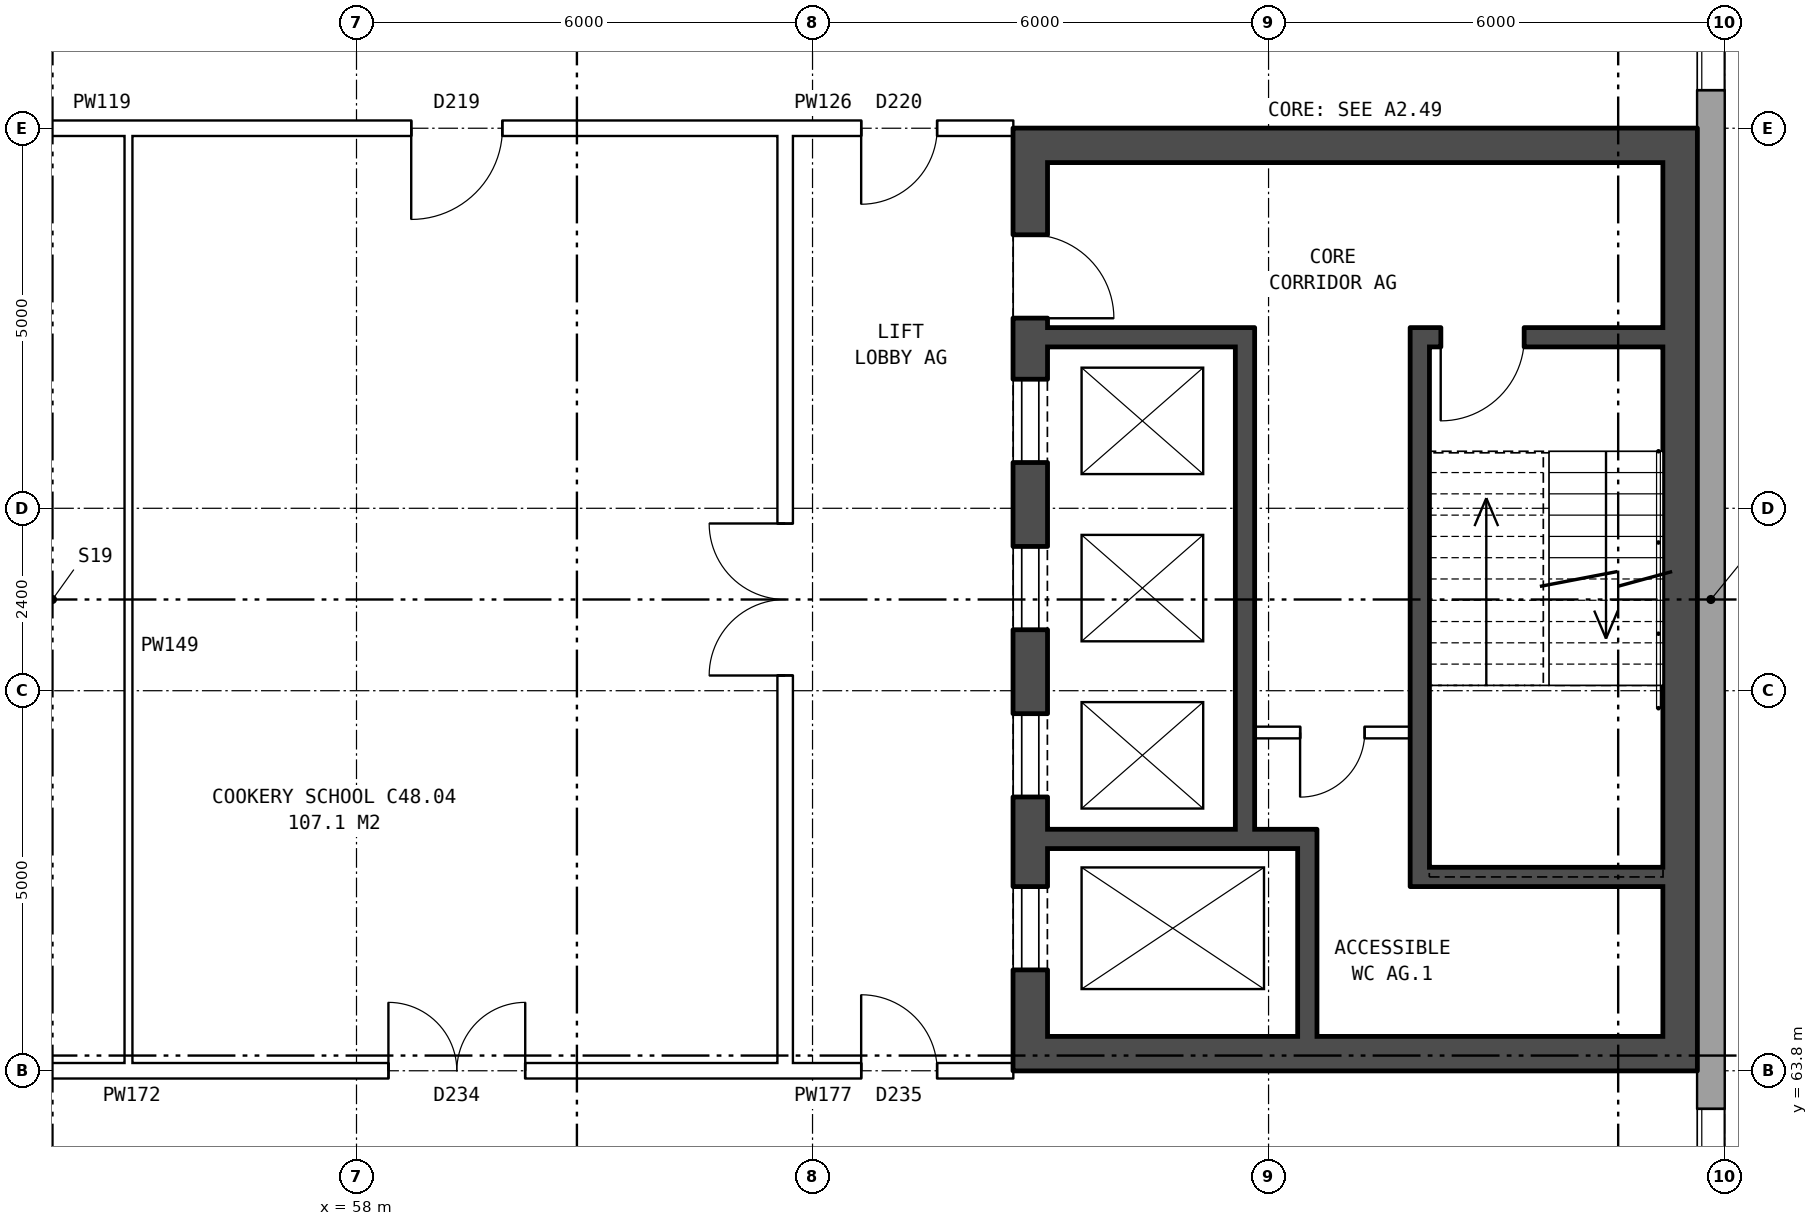
"""IFC4 building model, lengths in metres.
Left out: names, types, materials, properties, quantities, classifications, styles, units other than length and angle.
Written with IfcOpenShell. Run it as: python <this file> out.ifc"""

import sys

from ifc_helpers import new_model, si_unit, direction, frame, frame_2d, origin, place, context, subcontext, project, spatial, rectangle, extrude, element, fill, save


model = new_model("IFC4")
c1 = context("Model", 3, precision=1e-05, world=origin(), true_north=direction((0.0, 1.0)))
c2 = subcontext(c1, "Body", "Model", "MODEL_VIEW")
j1 = project(units=[si_unit("LENGTHUNIT", "METRE"), si_unit("PLANEANGLEUNIT", "RADIAN")], contexts=[c1])
p1 = place(None, origin())
s1 = spatial("IfcSite", under=j1, at=p1, CompositionType="ELEMENT")
p2 = place(p1, origin())
s2 = spatial("IfcBuilding", under=s1, at=p2, CompositionType="ELEMENT")
p3 = place(p2, frame((0.0, 0.0, 171.6)))
s3 = spatial("IfcBuildingStorey", under=s2, at=p3, CompositionType="ELEMENT", Elevation=171.6)
p4 = place(p3, frame((75.82, 57.075, 0.0), z_axis=(0.0, 0.0, 1.0), x_axis=(0.0, 1.0, 0.0)))
e1 = element("IfcWall", 1, at=p4, inside=s3, PredefinedType="STANDARD", context=c2, shape_type="SweptSolid", body=[
    extrude(rectangle(XDim=25.851, YDim=0.36, at=frame_2d((12.925, 0.0))), origin(), (0.0, 0.0, 1.0), 3.6),
])
p5 = place(p4, frame((1.625, 0.0, 0.8)))
e2 = element("IfcOpeningElement", 2, at=p5, cuts=e1, PredefinedType="OPENING", context=c2, shape_type="SweptSolid", body=[
    extrude(rectangle(XDim=1.6, YDim=1.8, at=frame_2d((0.8, 0.9))), frame((0.0, 0.19, 0.0), z_axis=(0.0, -1.0, 0.0), x_axis=(1.0, 0.0, 0.0)), (0.0, 0.0, 1.0), 0.38),
])
p6 = place(p4, frame((4.625, 0.0, 0.8)))
e3 = element("IfcOpeningElement", 3, at=p6, cuts=e1, PredefinedType="OPENING", context=c2, shape_type="SweptSolid", body=[
    extrude(rectangle(XDim=1.6, YDim=1.8, at=frame_2d((0.8, 0.9))), frame((0.0, 0.19, 0.0), z_axis=(0.0, -1.0, 0.0), x_axis=(1.0, 0.0, 0.0)), (0.0, 0.0, 1.0), 0.38),
])
p7 = place(p4, frame((19.625, 0.0, 0.8)))
e4 = element("IfcOpeningElement", 4, at=p7, cuts=e1, PredefinedType="OPENING", context=c2, shape_type="SweptSolid", body=[
    extrude(rectangle(XDim=1.6, YDim=1.8, at=frame_2d((0.8, 0.9))), frame((0.0, 0.19, 0.0), z_axis=(0.0, -1.0, 0.0), x_axis=(1.0, 0.0, 0.0)), (0.0, 0.0, 1.0), 0.38),
])
p8 = place(p4, frame((22.625, 0.0, 0.8)))
e5 = element("IfcOpeningElement", 5, at=p8, cuts=e1, PredefinedType="OPENING", context=c2, shape_type="SweptSolid", body=[
    extrude(rectangle(XDim=1.6, YDim=1.8, at=frame_2d((0.8, 0.9))), frame((0.0, 0.19, 0.0), z_axis=(0.0, -1.0, 0.0), x_axis=(1.0, 0.0, 0.0)), (0.0, 0.0, 1.0), 0.38),
])
p9 = place(p3, frame((66.865, 63.8, 0.0), z_axis=(0.0, 0.0, 1.0), x_axis=(0.0, 1.0, 0.0)))
e6 = element("IfcWall", 6, at=p9, inside=s3, PredefinedType="SHEAR", context=c2, shape_type="SweptSolid", body=[
    extrude(rectangle(XDim=12.4, YDim=0.45, at=frame_2d((6.2, 0.0))), origin(), (0.0, 0.0, 1.0), 3.6),
])
p10 = place(p9, frame((1.325, 0.0, 0.0)))
e7 = element("IfcOpeningElement", 7, at=p10, cuts=e6, PredefinedType="OPENING", context=c2, shape_type="SweptSolid", body=[
    extrude(rectangle(XDim=1.1, YDim=2.1, at=frame_2d((0.55, 1.05))), frame((0.0, 0.235, 0.0), z_axis=(0.0, -1.0, 0.0), x_axis=(1.0, 0.0, 0.0)), (0.0, 0.0, 1.0), 0.47),
])
p11 = place(p9, frame((3.6, 0.0, 0.0)))
e8 = element("IfcOpeningElement", 8, at=p11, cuts=e6, PredefinedType="OPENING", context=c2, shape_type="SweptSolid", body=[
    extrude(rectangle(XDim=1.1, YDim=2.1, at=frame_2d((0.55, 1.05))), frame((0.0, 0.235, 0.0), z_axis=(0.0, -1.0, 0.0), x_axis=(1.0, 0.0, 0.0)), (0.0, 0.0, 1.0), 0.47),
])
p12 = place(p9, frame((5.8, 0.0, 0.0)))
e9 = element("IfcOpeningElement", 9, at=p12, cuts=e6, PredefinedType="OPENING", context=c2, shape_type="SweptSolid", body=[
    extrude(rectangle(XDim=1.1, YDim=2.1, at=frame_2d((0.55, 1.05))), frame((0.0, 0.235, 0.0), z_axis=(0.0, -1.0, 0.0), x_axis=(1.0, 0.0, 0.0)), (0.0, 0.0, 1.0), 0.47),
])
p13 = place(p9, frame((8.0, 0.0, 0.0)))
e10 = element("IfcOpeningElement", 10, at=p13, cuts=e6, PredefinedType="OPENING", context=c2, shape_type="SweptSolid", body=[
    extrude(rectangle(XDim=1.1, YDim=2.1, at=frame_2d((0.55, 1.05))), frame((0.0, 0.235, 0.0), z_axis=(0.0, -1.0, 0.0), x_axis=(1.0, 0.0, 0.0)), (0.0, 0.0, 1.0), 0.47),
])
p14 = place(p9, frame((9.9, 0.0, 0.0)))
e11 = element("IfcOpeningElement", 11, at=p14, cuts=e6, PredefinedType="OPENING", context=c2, shape_type="SweptSolid", body=[
    extrude(rectangle(XDim=1.1, YDim=2.1, at=frame_2d((0.55, 1.05))), frame((0.0, 0.235, 0.0), z_axis=(0.0, -1.0, 0.0), x_axis=(1.0, 0.0, 0.0)), (0.0, 0.0, 1.0), 0.47),
])
p15 = place(p3, frame((75.415, 63.8, 0.0), z_axis=(0.0, 0.0, 1.0), x_axis=(0.0, 1.0, 0.0)))
e12 = element("IfcWall", 12, at=p15, inside=s3, PredefinedType="SHEAR", context=c2, shape_type="SweptSolid", body=[
    extrude(rectangle(XDim=12.4, YDim=0.45, at=frame_2d((6.2, 0.0))), origin(), (0.0, 0.0, 1.0), 3.6),
])
for number, where, z_axis, x_axis in (
    (13, (67.09, 64.025, 0.0), (0.0, 0.0, 1.0), (1.0, 0.0, 0.0)),
    (14, (67.09, 75.975, 0.0), (0.0, 0.0, 1.0), (1.0, 0.0, 0.0)),
):
    element("IfcWall", number, at=place(p3, frame(where, z_axis=z_axis, x_axis=x_axis)), inside=s3, PredefinedType="SHEAR", context=c2, shape_type="SweptSolid", body=[
        extrude(rectangle(XDim=8.1, YDim=0.45, at=frame_2d((4.05, 0.0))), origin(), (0.0, 0.0, 1.0), 3.6),
    ])
p16 = place(p3, frame((72.115, 66.35, 0.0), z_axis=(0.0, 0.0, 1.0), x_axis=(1.0, 0.0, 0.0)))
e15 = element("IfcWall", 15, at=p16, inside=s3, PredefinedType="SHEAR", context=c2, shape_type="SweptSolid", body=[
    extrude(rectangle(XDim=3.075, YDim=0.25, at=frame_2d((1.538, 0.0))), origin(), (0.0, 0.0, 1.0), 3.6),
])
p17 = place(p3, frame((67.09, 66.85, 0.0), z_axis=(0.0, 0.0, 1.0), x_axis=(1.0, 0.0, 0.0)))
e16 = element("IfcWall", 16, at=p17, inside=s3, PredefinedType="SHEAR", context=c2, shape_type="SweptSolid", body=[
    extrude(rectangle(XDim=3.545, YDim=0.25, at=frame_2d((1.772, 0.0))), origin(), (0.0, 0.0, 1.0), 3.6),
])
p18 = place(p3, frame((69.815, 68.25, 0.0), z_axis=(0.0, 0.0, 1.0), x_axis=(1.0, 0.0, 0.0)))
e17 = element("IfcWall", 17, at=p18, inside=s3, PredefinedType="PARTITIONING", context=c2, shape_type="SweptSolid", body=[
    extrude(rectangle(XDim=2.05, YDim=0.15, at=frame_2d((1.025, 0.0))), origin(), (0.0, 0.0, 1.0), 3.6),
])
p19 = place(p18, frame((0.6, 0.0, 0.0)))
e18 = element("IfcOpeningElement", 18, at=p19, cuts=e17, PredefinedType="OPENING", context=c2, shape_type="SweptSolid", body=[
    extrude(rectangle(XDim=0.85, YDim=2.1, at=frame_2d((0.425, 1.05))), frame((0.0, 0.085, 0.0), z_axis=(0.0, -1.0, 0.0), x_axis=(1.0, 0.0, 0.0)), (0.0, 0.0, 1.0), 0.17),
])
p20 = place(p3, frame((67.09, 73.45, 0.0), z_axis=(0.0, 0.0, 1.0), x_axis=(1.0, 0.0, 0.0)))
e19 = element("IfcWall", 19, at=p20, inside=s3, PredefinedType="SHEAR", context=c2, shape_type="SweptSolid", body=[
    extrude(rectangle(XDim=2.475, YDim=0.25, at=frame_2d((1.237, 0.0))), origin(), (0.0, 0.0, 1.0), 3.6),
])
p21 = place(p3, frame((72.115, 73.45, 0.0), z_axis=(0.0, 0.0, 1.0), x_axis=(1.0, 0.0, 0.0)))
e20 = element("IfcWall", 20, at=p21, inside=s3, PredefinedType="SHEAR", context=c2, shape_type="SweptSolid", body=[
    extrude(rectangle(XDim=3.075, YDim=0.25, at=frame_2d((1.538, 0.0))), origin(), (0.0, 0.0, 1.0), 3.6),
])
p22 = place(p21, frame((0.15, 0.0, 0.0)))
e21 = element("IfcOpeningElement", 21, at=p22, cuts=e20, PredefinedType="OPENING", context=c2, shape_type="SweptSolid", body=[
    extrude(rectangle(XDim=1.1, YDim=2.1, at=frame_2d((0.55, 1.05))), frame((0.0, 0.135, 0.0), z_axis=(0.0, -1.0, 0.0), x_axis=(1.0, 0.0, 0.0)), (0.0, 0.0, 1.0), 0.27),
])
p23 = place(p3, frame((69.69, 66.975, 0.0), z_axis=(0.0, 0.0, 1.0), x_axis=(0.0, 1.0, 0.0)))
e22 = element("IfcWall", 22, at=p23, inside=s3, PredefinedType="SHEAR", context=c2, shape_type="SweptSolid", body=[
    extrude(rectangle(XDim=6.6, YDim=0.25, at=frame_2d((3.3, 0.0))), origin(), (0.0, 0.0, 1.0), 3.6),
])
p24 = place(p3, frame((70.51, 64.25, 0.0), z_axis=(0.0, 0.0, 1.0), x_axis=(0.0, 1.0, 0.0)))
e23 = element("IfcWall", 23, at=p24, inside=s3, PredefinedType="SHEAR", context=c2, shape_type="SweptSolid", body=[
    extrude(rectangle(XDim=2.475, YDim=0.25, at=frame_2d((1.238, 0.0))), origin(), (0.0, 0.0, 1.0), 3.6),
])
p25 = place(p3, frame((71.99, 66.225, 0.0), z_axis=(0.0, 0.0, 1.0), x_axis=(0.0, 1.0, 0.0)))
e24 = element("IfcWall", 24, at=p25, inside=s3, PredefinedType="SHEAR", context=c2, shape_type="SweptSolid", body=[
    extrude(rectangle(XDim=7.35, YDim=0.25, at=frame_2d((3.675, 0.0))), origin(), (0.0, 0.0, 1.0), 3.6),
])
p26 = place(p3, frame((63.64, 63.9, 0.0), z_axis=(0.0, 0.0, 1.0), x_axis=(0.0, 1.0, 0.0)))
e25 = element("IfcWall", 25, at=p26, inside=s3, PredefinedType="PARTITIONING", context=c2, shape_type="SweptSolid", body=[
    extrude(rectangle(XDim=12.2, YDim=0.2, at=frame_2d((6.1, 0.0))), origin(), (0.0, 0.0, 1.0), 3.6),
])
p27 = place(p26, frame((5.1, 0.0, 0.0)))
e26 = element("IfcOpeningElement", 26, at=p27, cuts=e25, PredefinedType="OPENING", context=c2, shape_type="SweptSolid", body=[
    extrude(rectangle(XDim=2.0, YDim=2.1, at=frame_2d((1.0, 1.05))), frame((0.0, 0.11, 0.0), z_axis=(0.0, -1.0, 0.0), x_axis=(1.0, 0.0, 0.0)), (0.0, 0.0, 1.0), 0.22),
])
p28 = place(p3, frame((44.36, 63.8, 0.0), z_axis=(0.0, 0.0, 1.0), x_axis=(1.0, 0.0, 0.0)))
e27 = element("IfcWall", 27, at=p28, inside=s3, PredefinedType="PARTITIONING", context=c2, shape_type="SweptSolid", body=[
    extrude(rectangle(XDim=19.28, YDim=0.2, at=frame_2d((9.64, 0.0))), origin(), (0.0, 0.0, 1.0), 3.6),
])
p29 = place(p28, frame((4.42, 0.0, 0.0)))
e28 = element("IfcOpeningElement", 28, at=p29, cuts=e27, PredefinedType="OPENING", context=c2, shape_type="SweptSolid", body=[
    extrude(rectangle(XDim=1.8, YDim=2.1, at=frame_2d((0.9, 1.05))), frame((0.0, 0.11, 0.0), z_axis=(0.0, -1.0, 0.0), x_axis=(1.0, 0.0, 0.0)), (0.0, 0.0, 1.0), 0.22),
])
p30 = place(p28, frame((14.06, 0.0, 0.0)))
e29 = element("IfcOpeningElement", 29, at=p30, cuts=e27, PredefinedType="OPENING", context=c2, shape_type="SweptSolid", body=[
    extrude(rectangle(XDim=1.8, YDim=2.1, at=frame_2d((0.9, 1.05))), frame((0.0, 0.11, 0.0), z_axis=(0.0, -1.0, 0.0), x_axis=(1.0, 0.0, 0.0)), (0.0, 0.0, 1.0), 0.22),
])
p31 = place(p3, frame((63.64, 63.8, 0.0), z_axis=(0.0, 0.0, 1.0), x_axis=(1.0, 0.0, 0.0)))
e30 = element("IfcWall", 30, at=p31, inside=s3, PredefinedType="PARTITIONING", context=c2, shape_type="SweptSolid", body=[
    extrude(rectangle(XDim=3.0, YDim=0.2, at=frame_2d((1.5, 0.0))), origin(), (0.0, 0.0, 1.0), 3.6),
])
p32 = place(p31, frame((1.0, 0.0, 0.0)))
e31 = element("IfcOpeningElement", 31, at=p32, cuts=e30, PredefinedType="OPENING", context=c2, shape_type="SweptSolid", body=[
    extrude(rectangle(XDim=1.0, YDim=2.1, at=frame_2d((0.5, 1.05))), frame((0.0, 0.11, 0.0), z_axis=(0.0, -1.0, 0.0), x_axis=(1.0, 0.0, 0.0)), (0.0, 0.0, 1.0), 0.22),
])
p33 = place(p3, frame((44.36, 76.2, 0.0), z_axis=(0.0, 0.0, 1.0), x_axis=(1.0, 0.0, 0.0)))
e32 = element("IfcWall", 32, at=p33, inside=s3, PredefinedType="PARTITIONING", context=c2, shape_type="SweptSolid", body=[
    extrude(rectangle(XDim=19.28, YDim=0.2, at=frame_2d((9.64, 0.0))), origin(), (0.0, 0.0, 1.0), 3.6),
])
p34 = place(p33, frame((4.42, 0.0, 0.0)))
e33 = element("IfcOpeningElement", 33, at=p34, cuts=e32, PredefinedType="OPENING", context=c2, shape_type="SweptSolid", body=[
    extrude(rectangle(XDim=1.8, YDim=2.1, at=frame_2d((0.9, 1.05))), frame((0.0, 0.11, 0.0), z_axis=(0.0, -1.0, 0.0), x_axis=(1.0, 0.0, 0.0)), (0.0, 0.0, 1.0), 0.22),
])
p35 = place(p33, frame((14.36, 0.0, 0.0)))
e34 = element("IfcOpeningElement", 34, at=p35, cuts=e32, PredefinedType="OPENING", context=c2, shape_type="SweptSolid", body=[
    extrude(rectangle(XDim=1.2, YDim=2.1, at=frame_2d((0.6, 1.05))), frame((0.0, 0.11, 0.0), z_axis=(0.0, -1.0, 0.0), x_axis=(1.0, 0.0, 0.0)), (0.0, 0.0, 1.0), 0.22),
])
p36 = place(p3, frame((63.64, 76.2, 0.0), z_axis=(0.0, 0.0, 1.0), x_axis=(1.0, 0.0, 0.0)))
e35 = element("IfcWall", 35, at=p36, inside=s3, PredefinedType="PARTITIONING", context=c2, shape_type="SweptSolid", body=[
    extrude(rectangle(XDim=3.0, YDim=0.2, at=frame_2d((1.5, 0.0))), origin(), (0.0, 0.0, 1.0), 3.6),
])
p37 = place(p36, frame((1.0, 0.0, 0.0)))
e36 = element("IfcOpeningElement", 36, at=p37, cuts=e35, PredefinedType="OPENING", context=c2, shape_type="SweptSolid", body=[
    extrude(rectangle(XDim=1.0, YDim=2.1, at=frame_2d((0.5, 1.05))), frame((0.0, 0.11, 0.0), z_axis=(0.0, -1.0, 0.0), x_axis=(1.0, 0.0, 0.0)), (0.0, 0.0, 1.0), 0.22),
])
p38 = place(p3, frame((55.0, 63.7, 0.0), z_axis=(0.0, 0.0, 1.0), x_axis=(0.0, 1.0, 0.0)))
e37 = element("IfcWall", 37, at=p38, inside=s3, PredefinedType="PARTITIONING", context=c2, shape_type="SweptSolid", body=[
    extrude(rectangle(XDim=12.6, YDim=0.1, at=frame_2d((6.3, 0.0))), origin(), (0.0, 0.0, 1.0), 3.6),
])
p39 = place(p6, origin())
e38 = element("IfcWindow", 38, at=p39, inside=s3, PartitioningType="SINGLE_PANEL", PredefinedType="WINDOW", context=c2, shape_type="SweptSolid", body=[
    extrude(rectangle(XDim=1.6, YDim=1.8, at=frame_2d((0.8, 0.9))), frame((0.0, 0.15, 0.0), z_axis=(0.0, -1.0, 0.0), x_axis=(1.0, 0.0, 0.0)), (0.0, 0.0, 1.0), 0.06),
])
fill(e3, e38)
p40 = place(p7, origin())
e39 = element("IfcWindow", 39, at=p40, inside=s3, PartitioningType="SINGLE_PANEL", PredefinedType="WINDOW", context=c2, shape_type="SweptSolid", body=[
    extrude(rectangle(XDim=1.6, YDim=1.8, at=frame_2d((0.8, 0.9))), frame((0.0, 0.15, 0.0), z_axis=(0.0, -1.0, 0.0), x_axis=(1.0, 0.0, 0.0)), (0.0, 0.0, 1.0), 0.06),
])
fill(e4, e39)
p41 = place(p10, origin())
e40 = element("IfcDoor", 40, at=p41, inside=s3, OperationType="DOUBLE_DOOR_SLIDING", PredefinedType="DOOR", context=c2, shape_type="SweptSolid", body=[
    extrude(rectangle(XDim=1.1, YDim=2.1, at=frame_2d((0.55, 1.05))), frame((0.0, -0.16, 0.0), z_axis=(0.0, -1.0, 0.0), x_axis=(1.0, 0.0, 0.0)), (0.0, 0.0, 1.0), 0.05),
])
fill(e7, e40)
p42 = place(p11, origin())
e41 = element("IfcDoor", 41, at=p42, inside=s3, OperationType="DOUBLE_DOOR_SLIDING", PredefinedType="DOOR", context=c2, shape_type="SweptSolid", body=[
    extrude(rectangle(XDim=1.1, YDim=2.1, at=frame_2d((0.55, 1.05))), frame((0.0, -0.16, 0.0), z_axis=(0.0, -1.0, 0.0), x_axis=(1.0, 0.0, 0.0)), (0.0, 0.0, 1.0), 0.05),
])
fill(e8, e41)
p43 = place(p12, origin())
e42 = element("IfcDoor", 42, at=p43, inside=s3, OperationType="DOUBLE_DOOR_SLIDING", PredefinedType="DOOR", context=c2, shape_type="SweptSolid", body=[
    extrude(rectangle(XDim=1.1, YDim=2.1, at=frame_2d((0.55, 1.05))), frame((0.0, -0.16, 0.0), z_axis=(0.0, -1.0, 0.0), x_axis=(1.0, 0.0, 0.0)), (0.0, 0.0, 1.0), 0.05),
])
fill(e9, e42)
p44 = place(p13, origin())
e43 = element("IfcDoor", 43, at=p44, inside=s3, OperationType="DOUBLE_DOOR_SLIDING", PredefinedType="DOOR", context=c2, shape_type="SweptSolid", body=[
    extrude(rectangle(XDim=1.1, YDim=2.1, at=frame_2d((0.55, 1.05))), frame((0.0, -0.16, 0.0), z_axis=(0.0, -1.0, 0.0), x_axis=(1.0, 0.0, 0.0)), (0.0, 0.0, 1.0), 0.05),
])
fill(e10, e43)
p45 = place(p14, frame((1.1, 0.0, 0.0), z_axis=(0.0, 0.0, 1.0), x_axis=(-1.0, 0.0, 0.0)))
e44 = element("IfcDoor", 44, at=p45, inside=s3, OperationType="SINGLE_SWING_RIGHT", PredefinedType="DOOR", context=c2, shape_type="SweptSolid", body=[
    extrude(rectangle(XDim=1.1, YDim=2.1, at=frame_2d((0.55, 1.05))), frame((0.0, 0.21, 0.0), z_axis=(0.0, -1.0, 0.0), x_axis=(1.0, 0.0, 0.0)), (0.0, 0.0, 1.0), 0.05),
])
fill(e11, e44)
p46 = place(p22, frame((1.1, 0.0, 0.0), z_axis=(0.0, 0.0, 1.0), x_axis=(-1.0, 0.0, 0.0)))
e45 = element("IfcDoor", 45, at=p46, inside=s3, OperationType="SINGLE_SWING_RIGHT", PredefinedType="DOOR", context=c2, shape_type="SweptSolid", body=[
    extrude(rectangle(XDim=1.1, YDim=2.1, at=frame_2d((0.55, 1.05))), frame((0.0, 0.025, 0.0), z_axis=(0.0, -1.0, 0.0), x_axis=(1.0, 0.0, 0.0)), (0.0, 0.0, 1.0), 0.05),
])
fill(e21, e45)
p47 = place(p19, frame((0.85, 0.0, 0.0), z_axis=(0.0, 0.0, 1.0), x_axis=(-1.0, 0.0, 0.0)))
e46 = element("IfcDoor", 46, at=p47, inside=s3, OperationType="SINGLE_SWING_RIGHT", PredefinedType="DOOR", context=c2, shape_type="SweptSolid", body=[
    extrude(rectangle(XDim=0.85, YDim=2.1, at=frame_2d((0.425, 1.05))), frame((0.0, 0.025, 0.0), z_axis=(0.0, -1.0, 0.0), x_axis=(1.0, 0.0, 0.0)), (0.0, 0.0, 1.0), 0.05),
])
fill(e18, e46)
p48 = place(p27, origin())
e47 = element("IfcDoor", 47, at=p48, inside=s3, OperationType="DOUBLE_DOOR_SINGLE_SWING", PredefinedType="DOOR", context=c2, shape_type="SweptSolid", body=[
    extrude(rectangle(XDim=2.0, YDim=2.1, at=frame_2d((1.0, 1.05))), frame((0.0, 0.025, 0.0), z_axis=(0.0, -1.0, 0.0), x_axis=(1.0, 0.0, 0.0)), (0.0, 0.0, 1.0), 0.05),
])
fill(e26, e47)
p49 = place(p30, origin())
e48 = element("IfcDoor", 48, at=p49, inside=s3, OperationType="DOUBLE_DOOR_SINGLE_SWING", PredefinedType="DOOR", context=c2, shape_type="SweptSolid", body=[
    extrude(rectangle(XDim=1.8, YDim=2.1, at=frame_2d((0.9, 1.05))), frame((0.0, 0.025, 0.0), z_axis=(0.0, -1.0, 0.0), x_axis=(1.0, 0.0, 0.0)), (0.0, 0.0, 1.0), 0.05),
])
fill(e29, e48)
p50 = place(p32, origin())
e49 = element("IfcDoor", 49, at=p50, inside=s3, OperationType="SINGLE_SWING_LEFT", PredefinedType="DOOR", context=c2, shape_type="SweptSolid", body=[
    extrude(rectangle(XDim=1.0, YDim=2.1, at=frame_2d((0.5, 1.05))), frame((0.0, 0.025, 0.0), z_axis=(0.0, -1.0, 0.0), x_axis=(1.0, 0.0, 0.0)), (0.0, 0.0, 1.0), 0.05),
])
fill(e31, e49)
p51 = place(p35, frame((1.2, 0.0, 0.0), z_axis=(0.0, 0.0, 1.0), x_axis=(-1.0, 0.0, 0.0)))
e50 = element("IfcDoor", 50, at=p51, inside=s3, OperationType="SINGLE_SWING_RIGHT", PredefinedType="DOOR", context=c2, shape_type="SweptSolid", body=[
    extrude(rectangle(XDim=1.2, YDim=2.1, at=frame_2d((0.6, 1.05))), frame((0.0, 0.025, 0.0), z_axis=(0.0, -1.0, 0.0), x_axis=(1.0, 0.0, 0.0)), (0.0, 0.0, 1.0), 0.05),
])
fill(e34, e50)
p52 = place(p37, frame((1.0, 0.0, 0.0), z_axis=(0.0, 0.0, 1.0), x_axis=(-1.0, 0.0, 0.0)))
e51 = element("IfcDoor", 51, at=p52, inside=s3, OperationType="SINGLE_SWING_RIGHT", PredefinedType="DOOR", context=c2, shape_type="SweptSolid", body=[
    extrude(rectangle(XDim=1.0, YDim=2.1, at=frame_2d((0.5, 1.05))), frame((0.0, 0.025, 0.0), z_axis=(0.0, -1.0, 0.0), x_axis=(1.0, 0.0, 0.0)), (0.0, 0.0, 1.0), 0.05),
])
fill(e36, e51)
save(model, sys.argv[1])
